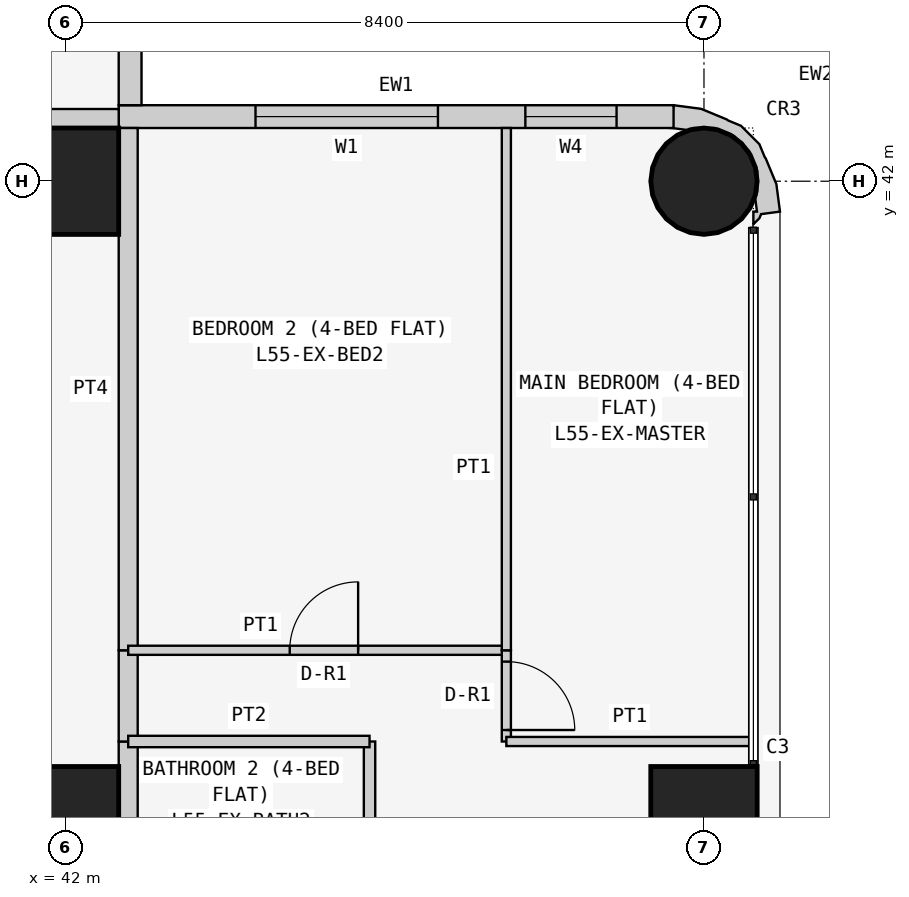
"""IFC4 building model, lengths in metres.
Left out: names, types, materials, properties, quantities, classifications, styles, units other than length and angle.
Written with IfcOpenShell. Run it as: python <this file> out.ifc"""

import sys

from ifc_helpers import new_model, si_unit, direction, frame, frame_2d, origin, origin_2d, place, context, subcontext, project, spatial, polyline, rectangle, circle, outline, extrude, element, fill, save


model = new_model("IFC4")
c1 = context("Model", 3, precision=1e-05, world=origin(), true_north=direction((0.0, 1.0)))
c2 = subcontext(c1, "Body", "Model", "MODEL_VIEW")
j1 = project(units=[si_unit("LENGTHUNIT", "METRE"), si_unit("PLANEANGLEUNIT", "RADIAN")], contexts=[c1])
p1 = place(None, origin())
s1 = spatial("IfcSite", under=j1, at=p1, CompositionType="ELEMENT")
p2 = place(p1, origin())
s2 = spatial("IfcBuilding", under=s1, at=p2, CompositionType="ELEMENT")
p3 = place(p2, frame((0.0, 0.0, 212.1)))
s3 = spatial("IfcBuildingStorey", under=s2, at=p3, CompositionType="ELEMENT", Elevation=212.1)
for number, where, z_axis, x_axis in (
    (1, (42.0, 33.6, 0.0), (0.0, 0.0, 1.0), (1.0, 0.0, 0.0)),
    (2, (42.0, 42.0, 0.0), (0.0, 0.0, 1.0), (1.0, 0.0, 0.0)),
    (3, (50.4, 33.6, 0.0), (0.0, 0.0, 1.0), (1.0, 0.0, 0.0)),
):
    element("IfcColumn", number, at=place(p3, frame(where, z_axis=z_axis, x_axis=x_axis)), inside=s3, PredefinedType="COLUMN", context=c2, shape_type="SweptSolid", body=[
        extrude(rectangle(XDim=1.4, YDim=1.4, at=origin_2d()), origin(), (0.0, 0.0, 1.0), 3.6),
    ])
p4 = place(p3, frame((50.4, 42.0, 0.0), z_axis=(0.0, 0.0, 1.0), x_axis=(1.0, 0.0, 0.0)))
e4 = element("IfcColumn", 4, at=p4, inside=s3, PredefinedType="COLUMN", context=c2, shape_type="SweptSolid", body=[
    extrude(circle(Radius=0.7, at=origin_2d()), origin(), (0.0, 0.0, 1.0), 3.6),
])
p5 = place(p3, frame((50.0, 42.85, 0.0), z_axis=(0.0, 0.0, 1.0), x_axis=(-1.0, 0.0, 0.0)))
e5 = element("IfcWall", 5, at=p5, inside=s3, PredefinedType="SOLIDWALL", context=c2, shape_type="SweptSolid", body=[
    extrude(rectangle(XDim=7.3, YDim=0.3, at=frame_2d((3.65, 0.0))), origin(), (0.0, 0.0, 1.0), 3.45),
])
p6 = place(p5, frame((3.1, 0.0, 0.9)))
e6 = element("IfcOpeningElement", 6, at=p6, cuts=e5, PredefinedType="OPENING", context=c2, shape_type="SweptSolid", body=[
    extrude(rectangle(XDim=2.4, YDim=1.5, at=frame_2d((1.2, 0.75))), frame((0.0, 0.16, 0.0), z_axis=(0.0, -1.0, 0.0), x_axis=(1.0, 0.0, 0.0)), (0.0, 0.0, 1.0), 0.32),
])
p7 = place(p5, frame((0.75, 0.0, 0.9)))
e7 = element("IfcOpeningElement", 7, at=p7, cuts=e5, PredefinedType="OPENING", context=c2, shape_type="SweptSolid", body=[
    extrude(rectangle(XDim=1.2, YDim=1.5, at=frame_2d((0.6, 0.75))), frame((0.0, 0.16, 0.0), z_axis=(0.0, -1.0, 0.0), x_axis=(1.0, 0.0, 0.0)), (0.0, 0.0, 1.0), 0.32),
])
p8 = place(p3, frame((42.85, 43.0, 0.0), z_axis=(0.0, 0.0, 1.0), x_axis=(0.0, 1.0, 0.0)))
e8 = element("IfcWall", 8, at=p8, inside=s3, PredefinedType="SOLIDWALL", context=c2, shape_type="SweptSolid", body=[
    extrude(rectangle(XDim=7.0, YDim=0.3, at=frame_2d((3.5, 0.0))), origin(), (0.0, 0.0, 1.0), 3.45),
])
p9 = place(p8, frame((1.5, 0.0, 0.9)))
e9 = element("IfcOpeningElement", 9, at=p9, cuts=e8, PredefinedType="OPENING", context=c2, shape_type="SweptSolid", body=[
    extrude(rectangle(XDim=2.4, YDim=1.5, at=frame_2d((1.2, 0.75))), frame((0.0, 0.16, 0.0), z_axis=(0.0, -1.0, 0.0), x_axis=(1.0, 0.0, 0.0)), (0.0, 0.0, 1.0), 0.32),
])
p10 = place(p8, frame((5.05, 0.0, 0.9)))
e10 = element("IfcOpeningElement", 10, at=p10, cuts=e8, PredefinedType="OPENING", context=c2, shape_type="SweptSolid", body=[
    extrude(rectangle(XDim=1.2, YDim=1.5, at=frame_2d((0.6, 0.75))), frame((0.0, 0.16, 0.0), z_axis=(0.0, -1.0, 0.0), x_axis=(1.0, 0.0, 0.0)), (0.0, 0.0, 1.0), 0.32),
])
p11 = place(p3, frame((50.988, 41.488, 0.0), z_axis=(0.0, 0.0, 1.0), x_axis=(0.898030234854, 0.439933741929, 0.0)))
e11 = element("IfcWall", 11, at=p11, inside=s3, PredefinedType="SOLIDWALL", context=c2, shape_type="SweptSolid", body=[
    extrude(outline(polyline([(0.138, -0.04), (0.182, -0.0), (0.419, -0.08), (0.536, 0.266), (0.559, 0.631), (0.555, 0.651), (0.566, 0.836), (0.455, 1.159), (0.333, 1.298), (0.324, 1.317), (0.082, 1.591), (-0.222, 1.793), (-0.39, 1.541), (-0.372, 1.532), (-0.195, 1.414), (-0.12, 1.41), (0.131, 1.287), (0.315, 1.078), (0.406, 0.814), (0.388, 0.536), (0.265, 0.285), (0.209, 0.235), (0.148, 0.053), (0.105, 0.074), (0.032, -0.076), (0.138, -0.04)])), origin(), (0.0, 0.0, 1.0), 3.45),
])
p12 = place(p3, frame((35.829, 42.825, 0.0), z_axis=(0.0, 0.0, 1.0), x_axis=(1.0, 0.0, 0.0)))
e12 = element("IfcWall", 12, at=p12, inside=s3, PredefinedType="PARTITIONING", context=c2, shape_type="SweptSolid", body=[
    extrude(rectangle(XDim=6.871, YDim=0.25, at=frame_2d((3.436, 0.0))), origin(), (0.0, 0.0, 1.0), 3.45),
])
p13 = place(p3, frame((42.825, 34.629, 0.0), z_axis=(0.0, 0.0, 1.0), x_axis=(0.0, -1.0, 0.0)))
e13 = element("IfcWall", 13, at=p13, inside=s3, PredefinedType="PARTITIONING", context=c2, shape_type="SweptSolid", body=[
    extrude(rectangle(XDim=2.629, YDim=0.25, at=frame_2d((1.314, 0.0))), origin(), (0.0, 0.0, 1.0), 3.45),
])
p14 = place(p3, frame((42.825, 35.829, 0.0), z_axis=(0.0, 0.0, 1.0), x_axis=(0.0, -1.0, 0.0)))
e14 = element("IfcWall", 14, at=p14, inside=s3, PredefinedType="PARTITIONING", context=c2, shape_type="SweptSolid", body=[
    extrude(rectangle(XDim=1.2, YDim=0.25, at=frame_2d((0.6, 0.0))), origin(), (0.0, 0.0, 1.0), 3.45),
])
p15 = place(p3, frame((42.825, 42.7, 0.0), z_axis=(0.0, 0.0, 1.0), x_axis=(0.0, -1.0, 0.0)))
e15 = element("IfcWall", 15, at=p15, inside=s3, PredefinedType="PARTITIONING", context=c2, shape_type="SweptSolid", body=[
    extrude(rectangle(XDim=6.871, YDim=0.25, at=frame_2d((3.436, 0.0))), origin(), (0.0, 0.0, 1.0), 3.45),
])
p16 = place(p3, frame((46.0, 32.0, 0.0), z_axis=(0.0, 0.0, 1.0), x_axis=(0.0, 1.0, 0.0)))
e16 = element("IfcWall", 16, at=p16, inside=s3, PredefinedType="PARTITIONING", context=c2, shape_type="SweptSolid", body=[
    extrude(rectangle(XDim=2.629, YDim=0.15, at=frame_2d((1.314, 0.0))), origin(), (0.0, 0.0, 1.0), 3.45),
])
p17 = place(p3, frame((46.0, 34.629, 0.0), z_axis=(0.0, 0.0, 1.0), x_axis=(-1.0, 0.0, 0.0)))
e17 = element("IfcWall", 17, at=p17, inside=s3, PredefinedType="PARTITIONING", context=c2, shape_type="SweptSolid", body=[
    extrude(rectangle(XDim=3.175, YDim=0.15, at=frame_2d((1.587, 0.0))), origin(), (0.0, 0.0, 1.0), 3.45),
])
p18 = place(p3, frame((42.825, 35.829, 0.0), z_axis=(0.0, 0.0, 1.0), x_axis=(1.0, 0.0, 0.0)))
e18 = element("IfcWall", 18, at=p18, inside=s3, PredefinedType="PARTITIONING", context=c2, shape_type="SweptSolid", body=[
    extrude(rectangle(XDim=4.975, YDim=0.12, at=frame_2d((2.488, 0.0))), origin(), (0.0, 0.0, 1.0), 3.45),
])
p19 = place(p18, frame((2.125, 0.0, 0.0)))
e19 = element("IfcOpeningElement", 19, at=p19, cuts=e18, PredefinedType="OPENING", context=c2, shape_type="SweptSolid", body=[
    extrude(rectangle(XDim=0.9, YDim=2.1, at=frame_2d((0.45, 1.05))), frame((0.0, 0.07, 0.0), z_axis=(0.0, -1.0, 0.0), x_axis=(1.0, 0.0, 0.0)), (0.0, 0.0, 1.0), 0.14),
])
p20 = place(p3, frame((47.8, 35.829, 0.0), z_axis=(0.0, 0.0, 1.0), x_axis=(0.0, -1.0, 0.0)))
e20 = element("IfcWall", 20, at=p20, inside=s3, PredefinedType="PARTITIONING", context=c2, shape_type="SweptSolid", body=[
    extrude(rectangle(XDim=1.2, YDim=0.12, at=frame_2d((0.6, 0.0))), origin(), (0.0, 0.0, 1.0), 3.45),
])
p21 = place(p20, frame((0.149, 0.0, 0.0)))
e21 = element("IfcOpeningElement", 21, at=p21, cuts=e20, PredefinedType="OPENING", context=c2, shape_type="SweptSolid", body=[
    extrude(rectangle(XDim=0.9, YDim=2.1, at=frame_2d((0.45, 1.05))), frame((0.0, 0.07, 0.0), z_axis=(0.0, -1.0, 0.0), x_axis=(1.0, 0.0, 0.0)), (0.0, 0.0, 1.0), 0.14),
])
p22 = place(p3, frame((47.8, 34.629, 0.0), z_axis=(0.0, 0.0, 1.0), x_axis=(1.0, 0.0, 0.0)))
e22 = element("IfcWall", 22, at=p22, inside=s3, PredefinedType="PARTITIONING", context=c2, shape_type="SweptSolid", body=[
    extrude(rectangle(XDim=3.25, YDim=0.12, at=frame_2d((1.625, 0.0))), origin(), (0.0, 0.0, 1.0), 3.45),
])
p23 = place(p3, frame((47.8, 35.829, 0.0), z_axis=(0.0, 0.0, 1.0), x_axis=(0.0, 1.0, 0.0)))
e23 = element("IfcWall", 23, at=p23, inside=s3, PredefinedType="PARTITIONING", context=c2, shape_type="SweptSolid", body=[
    extrude(rectangle(XDim=6.871, YDim=0.12, at=frame_2d((3.436, 0.0))), origin(), (0.0, 0.0, 1.0), 3.45),
])
p24 = place(p6, origin())
e24 = element("IfcWindow", 24, at=p24, inside=s3, PartitioningType="SINGLE_PANEL", PredefinedType="WINDOW", context=c2, shape_type="SweptSolid", body=[
    extrude(rectangle(XDim=2.4, YDim=1.5, at=frame_2d((1.2, 0.75))), frame((0.0, 0.03, 0.0), z_axis=(0.0, -1.0, 0.0), x_axis=(1.0, 0.0, 0.0)), (0.0, 0.0, 1.0), 0.06),
])
fill(e6, e24)
p25 = place(p7, origin())
e25 = element("IfcWindow", 25, at=p25, inside=s3, PartitioningType="SINGLE_PANEL", PredefinedType="WINDOW", context=c2, shape_type="SweptSolid", body=[
    extrude(rectangle(XDim=1.2, YDim=1.5, at=frame_2d((0.6, 0.75))), frame((0.0, 0.03, 0.0), z_axis=(0.0, -1.0, 0.0), x_axis=(1.0, 0.0, 0.0)), (0.0, 0.0, 1.0), 0.06),
])
fill(e7, e25)
p26 = place(p19, origin())
e26 = element("IfcDoor", 26, at=p26, inside=s3, OperationType="SINGLE_SWING_RIGHT", PredefinedType="DOOR", context=c2, shape_type="SweptSolid", body=[
    extrude(rectangle(XDim=0.9, YDim=2.1, at=frame_2d((0.45, 1.05))), frame((0.0, 0.025, 0.0), z_axis=(0.0, -1.0, 0.0), x_axis=(1.0, 0.0, 0.0)), (0.0, 0.0, 1.0), 0.05),
])
fill(e19, e26)
p27 = place(p21, origin())
e27 = element("IfcDoor", 27, at=p27, inside=s3, OperationType="SINGLE_SWING_RIGHT", PredefinedType="DOOR", context=c2, shape_type="SweptSolid", body=[
    extrude(rectangle(XDim=0.9, YDim=2.1, at=frame_2d((0.45, 1.05))), frame((0.0, 0.025, 0.0), z_axis=(0.0, -1.0, 0.0), x_axis=(1.0, 0.0, 0.0)), (0.0, 0.0, 1.0), 0.05),
])
fill(e21, e27)
save(model, sys.argv[1])
